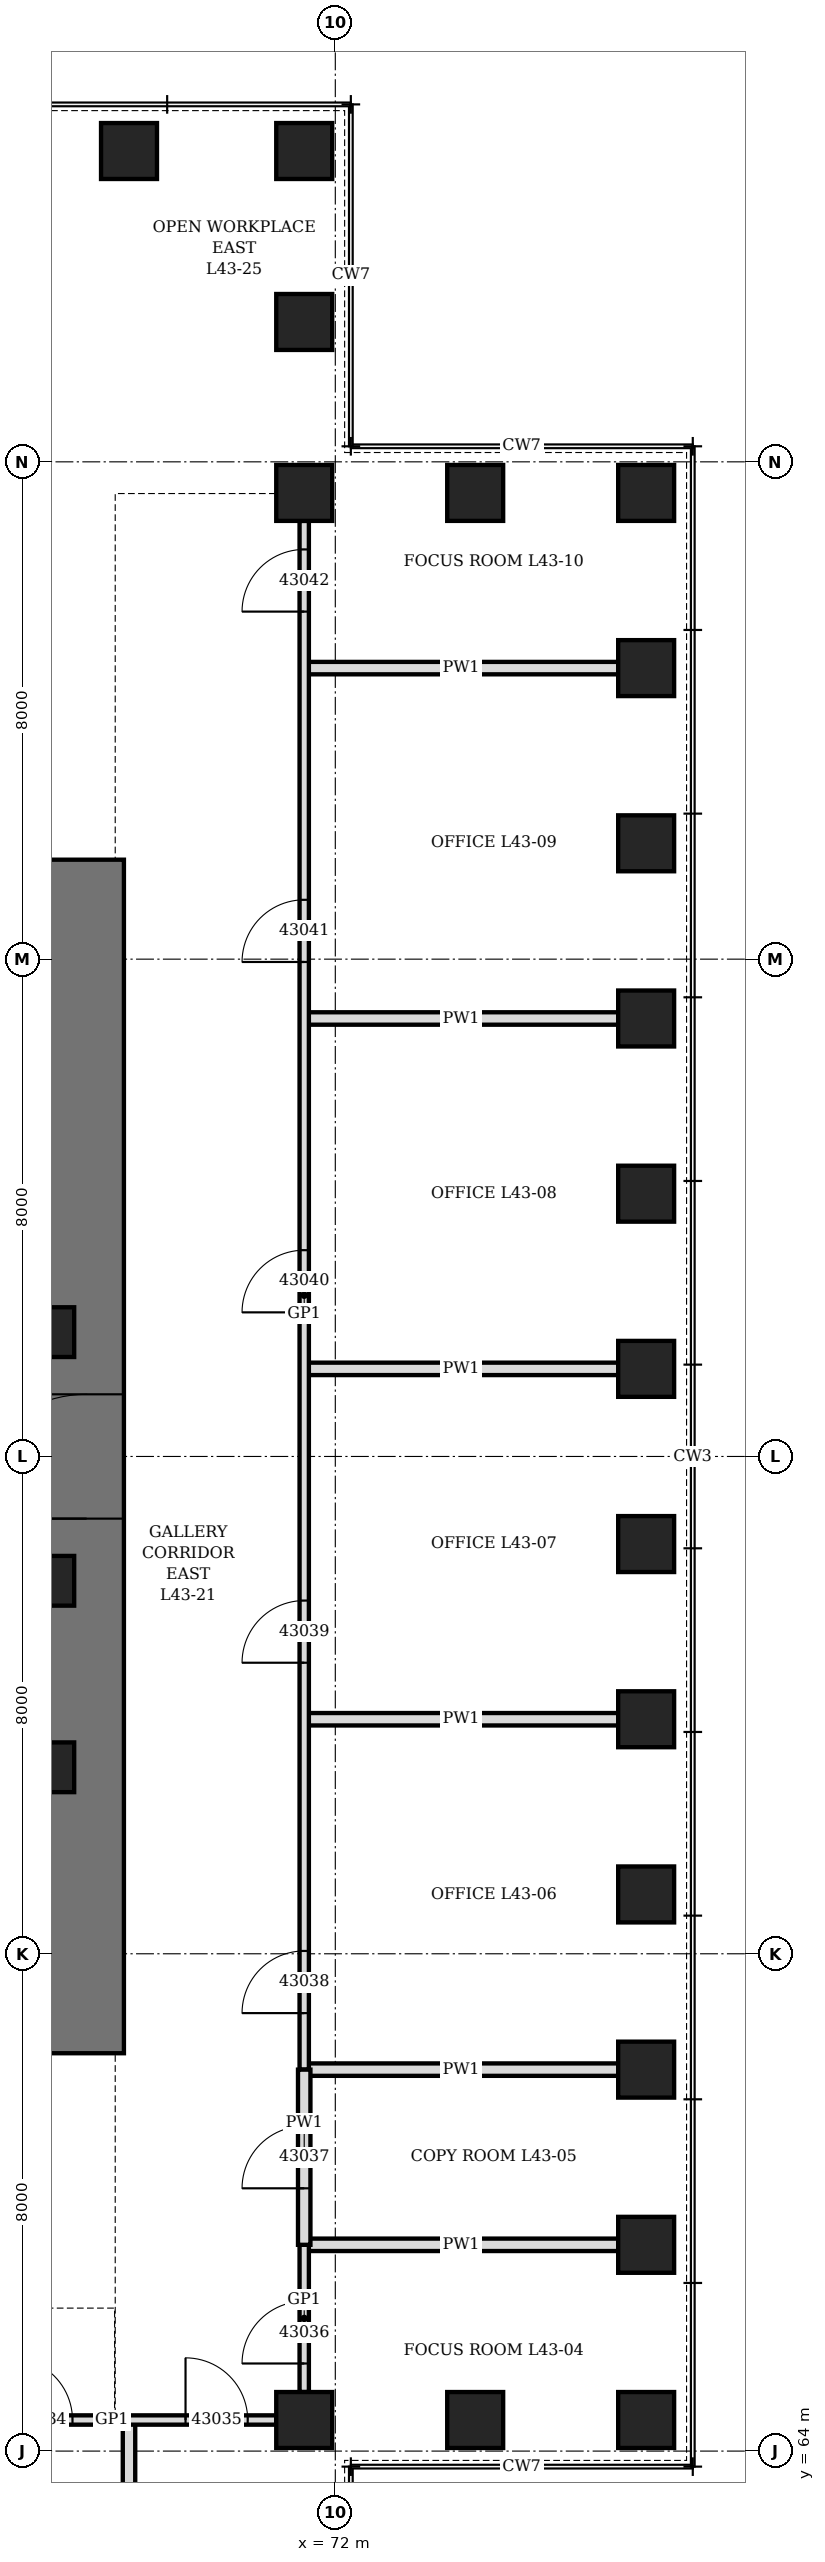
"""IFC4 building model, lengths in metres.
Left out: names, types, materials, properties, quantities, classifications, styles, units other than length and angle.
Written with IfcOpenShell. Run it as: python <this file> out.ifc"""

import sys

from ifc_helpers import new_model, si_unit, direction, frame, frame_2d, origin, origin_2d, place, context, subcontext, project, spatial, rectangle, hollow_rectangle, extrude, element, fill, save


model = new_model("IFC4")
c1 = context("Model", 3, precision=1e-05, world=origin(), true_north=direction((0.0, 1.0)))
c2 = subcontext(c1, "Body", "Model", "MODEL_VIEW")
j1 = project(units=[si_unit("LENGTHUNIT", "METRE"), si_unit("PLANEANGLEUNIT", "RADIAN")], contexts=[c1])
p1 = place(None, origin())
s1 = spatial("IfcSite", under=j1, at=p1, CompositionType="ELEMENT")
p2 = place(p1, origin())
s2 = spatial("IfcBuilding", under=s1, at=p2, CompositionType="ELEMENT")
p3 = place(p2, frame((0.0, 0.0, 193.9)))
s3 = spatial("IfcBuildingStorey", under=s2, at=p3, CompositionType="ELEMENT", Elevation=193.9)
for number, where, z_axis, x_axis in (
    (1, (71.5, 64.5, 0.0), (0.0, 0.0, 1.0), (1.0, 0.0, 0.0)),
    (2, (74.25, 64.5, 0.0), (0.0, 0.0, 1.0), (1.0, 0.0, 0.0)),
    (3, (77.0, 64.5, 0.0), (0.0, 0.0, 1.0), (0.0, 1.0, 0.0)),
    (4, (77.0, 67.318, 0.0), (0.0, 0.0, 1.0), (0.0, 1.0, 0.0)),
    (5, (77.0, 70.136, 0.0), (0.0, 0.0, 1.0), (0.0, 1.0, 0.0)),
    (6, (77.0, 72.955, 0.0), (0.0, 0.0, 1.0), (0.0, 1.0, 0.0)),
    (7, (77.0, 75.773, 0.0), (0.0, 0.0, 1.0), (0.0, 1.0, 0.0)),
    (8, (77.0, 78.591, 0.0), (0.0, 0.0, 1.0), (0.0, 1.0, 0.0)),
    (9, (77.0, 81.409, 0.0), (0.0, 0.0, 1.0), (0.0, 1.0, 0.0)),
    (10, (77.0, 84.227, 0.0), (0.0, 0.0, 1.0), (0.0, 1.0, 0.0)),
    (11, (77.0, 87.045, 0.0), (0.0, 0.0, 1.0), (0.0, 1.0, 0.0)),
    (12, (77.0, 89.864, 0.0), (0.0, 0.0, 1.0), (0.0, 1.0, 0.0)),
    (13, (77.0, 92.682, 0.0), (0.0, 0.0, 1.0), (0.0, 1.0, 0.0)),
    (14, (77.0, 95.5, 0.0), (0.0, 0.0, 1.0), (1.0, 0.0, 0.0)),
    (15, (74.25, 95.5, 0.0), (0.0, 0.0, 1.0), (1.0, 0.0, 0.0)),
    (16, (71.5, 95.5, 0.0), (0.0, 0.0, 1.0), (0.0, 1.0, 0.0)),
    (17, (71.5, 98.25, 0.0), (0.0, 0.0, 1.0), (0.0, 1.0, 0.0)),
    (18, (71.5, 101.0, 0.0), (0.0, 0.0, 1.0), (1.0, 0.0, 0.0)),
    (19, (68.682, 101.0, 0.0), (0.0, 0.0, 1.0), (1.0, 0.0, 0.0)),
):
    element("IfcColumn", number, at=place(p3, frame(where, z_axis=z_axis, x_axis=x_axis)), inside=s3, PredefinedType="COLUMN", context=c2, shape_type="SweptSolid", body=[
        extrude(hollow_rectangle(XDim=0.9, YDim=0.9, WallThickness=0.12, at=origin_2d()), origin(), (0.0, 0.0, 1.0), 4.2),
    ])
p4 = place(p3, frame((68.0, 70.4, 0.0), z_axis=(0.0, 0.0, 1.0), x_axis=(0.0, 1.0, 0.0)))
e20 = element("IfcWall", 20, at=p4, inside=s3, PredefinedType="SHEAR", context=c2, shape_type="SweptSolid", body=[
    extrude(rectangle(XDim=19.2, YDim=1.2, at=frame_2d((9.6, 0.0))), origin(), (0.0, 0.0, 1.0), 4.2),
])
p5 = place(p4, frame((8.6, 0.0, 0.0)))
e21 = element("IfcOpeningElement", 21, at=p5, cuts=e20, PredefinedType="OPENING", context=c2, shape_type="SweptSolid", body=[
    extrude(rectangle(XDim=2.0, YDim=2.4, at=frame_2d((1.0, 1.2))), frame((0.0, 0.61, 0.0), z_axis=(0.0, -1.0, 0.0), x_axis=(1.0, 0.0, 0.0)), (0.0, 0.0, 1.0), 1.22),
])
for number, where, z_axis, x_axis in (
    (22, (67.4, 75.0, 0.0), (0.0, 0.0, 1.0), (1.0, 0.0, 0.0)),
    (23, (67.4, 78.0, 0.0), (0.0, 0.0, 1.0), (1.0, 0.0, 0.0)),
    (24, (67.4, 82.0, 0.0), (0.0, 0.0, 1.0), (1.0, 0.0, 0.0)),
):
    element("IfcColumn", number, at=place(p3, frame(where, z_axis=z_axis, x_axis=x_axis)), inside=s3, PredefinedType="COLUMN", context=c2, shape_type="SweptSolid", body=[
        extrude(hollow_rectangle(XDim=0.8, YDim=0.8, WallThickness=0.1, at=origin_2d()), origin(), (0.0, 0.0, 1.0), 4.2),
    ])
for number, where, z_axis, x_axis in (
    (25, (68.682, 59.45, 0.0), (0.0, 0.0, 1.0), (0.0, 1.0, 0.0)),
    (26, (71.5, 67.318, 0.0), (0.0, 0.0, 1.0), (1.0, 0.0, 0.0)),
    (27, (71.5, 70.136, 0.0), (0.0, 0.0, 1.0), (1.0, 0.0, 0.0)),
    (28, (71.5, 75.773, 0.0), (0.0, 0.0, 1.0), (1.0, 0.0, 0.0)),
    (29, (71.5, 81.409, 0.0), (0.0, 0.0, 1.0), (1.0, 0.0, 0.0)),
    (30, (71.5, 87.045, 0.0), (0.0, 0.0, 1.0), (1.0, 0.0, 0.0)),
    (31, (71.5, 92.682, 0.0), (0.0, 0.0, 1.0), (1.0, 0.0, 0.0)),
):
    element("IfcWall", number, at=place(p3, frame(where, z_axis=z_axis, x_axis=x_axis)), inside=s3, PredefinedType="PARTITIONING", context=c2, shape_type="SweptSolid", body=[
        extrude(rectangle(XDim=5.05, YDim=0.2, at=frame_2d((2.525, 0.0))), origin(), (0.0, 0.0, 1.0), 3.428),
    ])
p6 = place(p3, frame((65.764, 64.5, 0.0), z_axis=(0.0, 0.0, 1.0), x_axis=(1.0, 0.0, 0.0)))
e32 = element("IfcWall", 32, at=p6, inside=s3, PredefinedType="PARTITIONING", context=c2, shape_type="SweptSolid", body=[
    extrude(rectangle(XDim=5.286, YDim=0.15, at=frame_2d((2.643, 0.0))), origin(), (0.0, 0.0, 1.0), 4.04),
])
p7 = place(p6, frame((1.009, 0.0, 0.0)))
e33 = element("IfcOpeningElement", 33, at=p7, cuts=e32, PredefinedType="OPENING", context=c2, shape_type="SweptSolid", body=[
    extrude(rectangle(XDim=1.0, YDim=2.4, at=frame_2d((0.5, 1.2))), frame((0.0, 0.085, 0.0), z_axis=(0.0, -1.0, 0.0), x_axis=(1.0, 0.0, 0.0)), (0.0, 0.0, 1.0), 0.17),
])
p8 = place(p6, frame((3.827, 0.0, 0.0)))
e34 = element("IfcOpeningElement", 34, at=p8, cuts=e32, PredefinedType="OPENING", context=c2, shape_type="SweptSolid", body=[
    extrude(rectangle(XDim=1.0, YDim=2.4, at=frame_2d((0.5, 1.2))), frame((0.0, 0.085, 0.0), z_axis=(0.0, -1.0, 0.0), x_axis=(1.0, 0.0, 0.0)), (0.0, 0.0, 1.0), 0.17),
])
p9 = place(p3, frame((71.5, 64.95, 0.0), z_axis=(0.0, 0.0, 1.0), x_axis=(0.0, 1.0, 0.0)))
e35 = element("IfcWall", 35, at=p9, inside=s3, PredefinedType="PARTITIONING", context=c2, shape_type="SweptSolid", body=[
    extrude(rectangle(XDim=2.368, YDim=0.15, at=frame_2d((1.184, 0.0))), origin(), (0.0, 0.0, 1.0), 4.04),
])
p10 = place(p9, frame((0.459, 0.0, 0.0)))
e36 = element("IfcOpeningElement", 36, at=p10, cuts=e35, PredefinedType="OPENING", context=c2, shape_type="SweptSolid", body=[
    extrude(rectangle(XDim=1.0, YDim=2.4, at=frame_2d((0.5, 1.2))), frame((0.0, 0.085, 0.0), z_axis=(0.0, -1.0, 0.0), x_axis=(1.0, 0.0, 0.0)), (0.0, 0.0, 1.0), 0.17),
])
p11 = place(p3, frame((71.5, 70.136, 0.0), z_axis=(0.0, 0.0, 1.0), x_axis=(0.0, 1.0, 0.0)))
e37 = element("IfcWall", 37, at=p11, inside=s3, PredefinedType="PARTITIONING", context=c2, shape_type="SweptSolid", body=[
    extrude(rectangle(XDim=24.914, YDim=0.15, at=frame_2d((12.457, 0.0))), origin(), (0.0, 0.0, 1.0), 4.04),
])
p12 = place(p11, frame((0.909, 0.0, 0.0)))
e38 = element("IfcOpeningElement", 38, at=p12, cuts=e37, PredefinedType="OPENING", context=c2, shape_type="SweptSolid", body=[
    extrude(rectangle(XDim=1.0, YDim=2.1, at=frame_2d((0.5, 1.05))), frame((0.0, 0.085, 0.0), z_axis=(0.0, -1.0, 0.0), x_axis=(1.0, 0.0, 0.0)), (0.0, 0.0, 1.0), 0.17),
])
p13 = place(p11, frame((6.545, 0.0, 0.0)))
e39 = element("IfcOpeningElement", 39, at=p13, cuts=e37, PredefinedType="OPENING", context=c2, shape_type="SweptSolid", body=[
    extrude(rectangle(XDim=1.0, YDim=2.1, at=frame_2d((0.5, 1.05))), frame((0.0, 0.085, 0.0), z_axis=(0.0, -1.0, 0.0), x_axis=(1.0, 0.0, 0.0)), (0.0, 0.0, 1.0), 0.17),
])
p14 = place(p11, frame((12.182, 0.0, 0.0)))
e40 = element("IfcOpeningElement", 40, at=p14, cuts=e37, PredefinedType="OPENING", context=c2, shape_type="SweptSolid", body=[
    extrude(rectangle(XDim=1.0, YDim=2.1, at=frame_2d((0.5, 1.05))), frame((0.0, 0.085, 0.0), z_axis=(0.0, -1.0, 0.0), x_axis=(1.0, 0.0, 0.0)), (0.0, 0.0, 1.0), 0.17),
])
p15 = place(p11, frame((17.818, 0.0, 0.0)))
e41 = element("IfcOpeningElement", 41, at=p15, cuts=e37, PredefinedType="OPENING", context=c2, shape_type="SweptSolid", body=[
    extrude(rectangle(XDim=1.0, YDim=2.1, at=frame_2d((0.5, 1.05))), frame((0.0, 0.085, 0.0), z_axis=(0.0, -1.0, 0.0), x_axis=(1.0, 0.0, 0.0)), (0.0, 0.0, 1.0), 0.17),
])
p16 = place(p11, frame((23.455, 0.0, 0.0)))
e42 = element("IfcOpeningElement", 42, at=p16, cuts=e37, PredefinedType="OPENING", context=c2, shape_type="SweptSolid", body=[
    extrude(rectangle(XDim=1.0, YDim=2.4, at=frame_2d((0.5, 1.2))), frame((0.0, 0.085, 0.0), z_axis=(0.0, -1.0, 0.0), x_axis=(1.0, 0.0, 0.0)), (0.0, 0.0, 1.0), 0.17),
])
p17 = place(p3, frame((71.5, 67.318, 0.0), z_axis=(0.0, 0.0, 1.0), x_axis=(0.0, 1.0, 0.0)))
e43 = element("IfcWall", 43, at=p17, inside=s3, PredefinedType="PARTITIONING", context=c2, shape_type="SweptSolid", body=[
    extrude(rectangle(XDim=2.818, YDim=0.2, at=frame_2d((1.409, 0.0))), origin(), (0.0, 0.0, 1.0), 4.04),
])
p18 = place(p17, frame((0.909, 0.0, 0.0)))
e44 = element("IfcOpeningElement", 44, at=p18, cuts=e43, PredefinedType="OPENING", context=c2, shape_type="SweptSolid", body=[
    extrude(rectangle(XDim=1.0, YDim=2.1, at=frame_2d((0.5, 1.05))), frame((0.0, 0.11, 0.0), z_axis=(0.0, -1.0, 0.0), x_axis=(1.0, 0.0, 0.0)), (0.0, 0.0, 1.0), 0.22),
])
p19 = place(p5, origin())
e45 = element("IfcDoor", 45, at=p19, inside=s3, OperationType="DOUBLE_DOOR_SINGLE_SWING", PredefinedType="DOOR", context=c2, shape_type="SweptSolid", body=[
    extrude(rectangle(XDim=2.0, YDim=2.4, at=frame_2d((1.0, 1.2))), frame((0.0, 0.35, 0.0), z_axis=(0.0, -1.0, 0.0), x_axis=(1.0, 0.0, 0.0)), (0.0, 0.0, 1.0), 0.7),
])
fill(e21, e45)
p20 = place(p7, origin())
e46 = element("IfcDoor", 46, at=p20, inside=s3, OperationType="SINGLE_SWING_RIGHT", PredefinedType="DOOR", context=c2, shape_type="SweptSolid", body=[
    extrude(rectangle(XDim=1.0, YDim=2.4, at=frame_2d((0.5, 1.2))), frame((0.0, 0.075, 0.0), z_axis=(0.0, -1.0, 0.0), x_axis=(1.0, 0.0, 0.0)), (0.0, 0.0, 1.0), 0.149),
])
fill(e33, e46)
p21 = place(p8, origin())
e47 = element("IfcDoor", 47, at=p21, inside=s3, OperationType="SINGLE_SWING_RIGHT", PredefinedType="DOOR", context=c2, shape_type="SweptSolid", body=[
    extrude(rectangle(XDim=1.0, YDim=2.4, at=frame_2d((0.5, 1.2))), frame((0.0, 0.075, 0.0), z_axis=(0.0, -1.0, 0.0), x_axis=(1.0, 0.0, 0.0)), (0.0, 0.0, 1.0), 0.149),
])
fill(e34, e47)
p22 = place(p10, origin())
e48 = element("IfcDoor", 48, at=p22, inside=s3, OperationType="SINGLE_SWING_RIGHT", PredefinedType="DOOR", context=c2, shape_type="SweptSolid", body=[
    extrude(rectangle(XDim=1.0, YDim=2.4, at=frame_2d((0.5, 1.2))), frame((0.0, 0.075, 0.0), z_axis=(0.0, -1.0, 0.0), x_axis=(1.0, 0.0, 0.0)), (0.0, 0.0, 1.0), 0.149),
])
fill(e36, e48)
p23 = place(p18, origin())
e49 = element("IfcDoor", 49, at=p23, inside=s3, OperationType="SINGLE_SWING_LEFT", PredefinedType="DOOR", context=c2, shape_type="SweptSolid", body=[
    extrude(rectangle(XDim=1.0, YDim=2.1, at=frame_2d((0.5, 1.05))), frame((0.0, 0.1, 0.0), z_axis=(0.0, -1.0, 0.0), x_axis=(1.0, 0.0, 0.0)), (0.0, 0.0, 1.0), 0.199),
])
fill(e44, e49)
p24 = place(p12, origin())
e50 = element("IfcDoor", 50, at=p24, inside=s3, OperationType="SINGLE_SWING_LEFT", PredefinedType="DOOR", context=c2, shape_type="SweptSolid", body=[
    extrude(rectangle(XDim=1.0, YDim=2.1, at=frame_2d((0.5, 1.05))), frame((0.0, 0.075, 0.0), z_axis=(0.0, -1.0, 0.0), x_axis=(1.0, 0.0, 0.0)), (0.0, 0.0, 1.0), 0.149),
])
fill(e38, e50)
p25 = place(p13, origin())
e51 = element("IfcDoor", 51, at=p25, inside=s3, OperationType="SINGLE_SWING_LEFT", PredefinedType="DOOR", context=c2, shape_type="SweptSolid", body=[
    extrude(rectangle(XDim=1.0, YDim=2.1, at=frame_2d((0.5, 1.05))), frame((0.0, 0.075, 0.0), z_axis=(0.0, -1.0, 0.0), x_axis=(1.0, 0.0, 0.0)), (0.0, 0.0, 1.0), 0.149),
])
fill(e39, e51)
p26 = place(p14, origin())
e52 = element("IfcDoor", 52, at=p26, inside=s3, OperationType="SINGLE_SWING_LEFT", PredefinedType="DOOR", context=c2, shape_type="SweptSolid", body=[
    extrude(rectangle(XDim=1.0, YDim=2.1, at=frame_2d((0.5, 1.05))), frame((0.0, 0.075, 0.0), z_axis=(0.0, -1.0, 0.0), x_axis=(1.0, 0.0, 0.0)), (0.0, 0.0, 1.0), 0.149),
])
fill(e40, e52)
p27 = place(p15, origin())
e53 = element("IfcDoor", 53, at=p27, inside=s3, OperationType="SINGLE_SWING_LEFT", PredefinedType="DOOR", context=c2, shape_type="SweptSolid", body=[
    extrude(rectangle(XDim=1.0, YDim=2.1, at=frame_2d((0.5, 1.05))), frame((0.0, 0.075, 0.0), z_axis=(0.0, -1.0, 0.0), x_axis=(1.0, 0.0, 0.0)), (0.0, 0.0, 1.0), 0.149),
])
fill(e41, e53)
p28 = place(p16, origin())
e54 = element("IfcDoor", 54, at=p28, inside=s3, OperationType="SINGLE_SWING_RIGHT", PredefinedType="DOOR", context=c2, shape_type="SweptSolid", body=[
    extrude(rectangle(XDim=1.0, YDim=2.4, at=frame_2d((0.5, 1.2))), frame((0.0, 0.075, 0.0), z_axis=(0.0, -1.0, 0.0), x_axis=(1.0, 0.0, 0.0)), (0.0, 0.0, 1.0), 0.149),
])
fill(e42, e54)
save(model, sys.argv[1])
